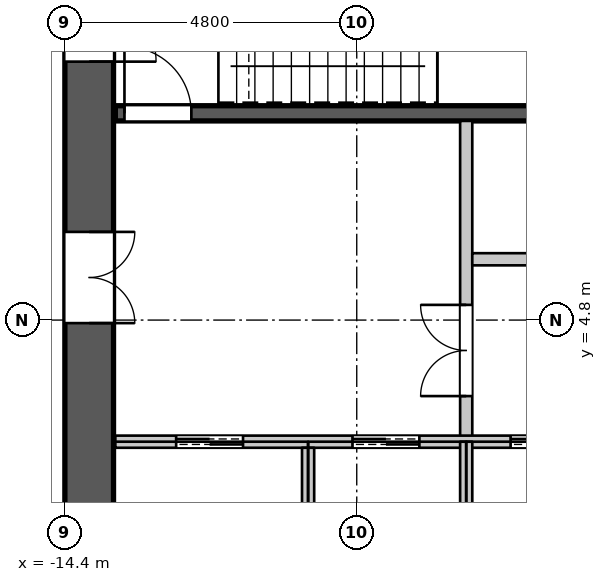
"""IFC4 building model, lengths in metres.
Left out: names, types, materials, properties, quantities, classifications, styles, units other than length and angle.
Written with IfcOpenShell. Run it as: python <this file> out.ifc"""

import sys

from ifc_helpers import new_model, si_unit, direction, frame, frame_2d, origin, place, context, subcontext, project, spatial, rectangle, extrude, element, fill, save


model = new_model("IFC4")
c1 = context("Model", 3, precision=1e-05, world=origin(), true_north=direction((0.0, 1.0)))
c2 = subcontext(c1, "Body", "Model", "MODEL_VIEW")
j1 = project(units=[si_unit("LENGTHUNIT", "METRE"), si_unit("PLANEANGLEUNIT", "RADIAN")], contexts=[c1])
p1 = place(None, origin())
s1 = spatial("IfcSite", under=j1, at=p1, CompositionType="ELEMENT")
p2 = place(p1, origin())
s2 = spatial("IfcBuilding", under=s1, at=p2, CompositionType="ELEMENT")
p3 = place(p2, frame((0.0, 0.0, 131.7)))
s3 = spatial("IfcBuildingStorey", under=s2, at=p3, CompositionType="ELEMENT", Elevation=131.7)
p4 = place(p3, frame((-14.0, -11.2, 0.0), z_axis=(0.0, 0.0, 1.0), x_axis=(0.0, 1.0, 0.0)))
e1 = element("IfcWall", 1, at=p4, inside=s3, PredefinedType="SHEAR", context=c2, shape_type="SweptSolid", body=[
    extrude(rectangle(XDim=22.4, YDim=0.8, at=frame_2d((11.2, 0.0))), origin(), (0.0, 0.0, 1.0), 4.2),
])
p5 = place(p4, frame((20.25, 0.0, 0.0)))
e2 = element("IfcOpeningElement", 2, at=p5, cuts=e1, PredefinedType="OPENING", context=c2, shape_type="SweptSolid", body=[
    extrude(rectangle(XDim=1.1, YDim=2.2, at=frame_2d((0.55, 1.1))), frame((0.0, 0.41, 0.0), z_axis=(0.0, -1.0, 0.0), x_axis=(1.0, 0.0, 0.0)), (0.0, 0.0, 1.0), 0.82),
])
p6 = place(p4, frame((1.05, 0.0, 0.0)))
e3 = element("IfcOpeningElement", 3, at=p6, cuts=e1, PredefinedType="OPENING", context=c2, shape_type="SweptSolid", body=[
    extrude(rectangle(XDim=1.1, YDim=2.2, at=frame_2d((0.55, 1.1))), frame((0.0, 0.41, 0.0), z_axis=(0.0, -1.0, 0.0), x_axis=(1.0, 0.0, 0.0)), (0.0, 0.0, 1.0), 0.82),
])
p7 = place(p4, frame((15.95, 0.0, 0.0)))
e4 = element("IfcOpeningElement", 4, at=p7, cuts=e1, PredefinedType="OPENING", context=c2, shape_type="SweptSolid", body=[
    extrude(rectangle(XDim=1.5, YDim=2.4, at=frame_2d((0.75, 1.2))), frame((0.0, 0.41, 0.0), z_axis=(0.0, -1.0, 0.0), x_axis=(1.0, 0.0, 0.0)), (0.0, 0.0, 1.0), 0.82),
])
p8 = place(p4, frame((4.95, 0.0, 0.0)))
e5 = element("IfcOpeningElement", 5, at=p8, cuts=e1, PredefinedType="OPENING", context=c2, shape_type="SweptSolid", body=[
    extrude(rectangle(XDim=1.5, YDim=2.4, at=frame_2d((0.75, 1.2))), frame((0.0, 0.41, 0.0), z_axis=(0.0, -1.0, 0.0), x_axis=(1.0, 0.0, 0.0)), (0.0, 0.0, 1.0), 0.82),
])
p9 = place(p3, frame((-7.8, 2.8, 0.0), z_axis=(0.0, 0.0, 1.0), x_axis=(0.0, 1.0, 0.0)))
e6 = element("IfcWall", 6, at=p9, inside=s3, PredefinedType="PARTITIONING", context=c2, shape_type="SweptSolid", body=[
    extrude(rectangle(XDim=5.275, YDim=0.2, at=frame_2d((2.637, 0.0))), origin(), (0.0, 0.0, 1.0), 3.95),
])
p10 = place(p9, frame((0.75, 0.0, 0.0)))
e7 = element("IfcOpeningElement", 7, at=p10, cuts=e6, PredefinedType="OPENING", context=c2, shape_type="SweptSolid", body=[
    extrude(rectangle(XDim=1.5, YDim=2.4, at=frame_2d((0.75, 1.2))), frame((0.0, 0.11, 0.0), z_axis=(0.0, -1.0, 0.0), x_axis=(1.0, 0.0, 0.0)), (0.0, 0.0, 1.0), 0.22),
])
p11 = place(p3, frame((-7.7, 5.8, 0.0), z_axis=(0.0, 0.0, 1.0), x_axis=(1.0, 0.0, 0.0)))
e8 = element("IfcWall", 8, at=p11, inside=s3, PredefinedType="PARTITIONING", context=c2, shape_type="SweptSolid", body=[
    extrude(rectangle(XDim=21.27, YDim=0.2, at=frame_2d((10.635, 0.0))), origin(), (0.0, 0.0, 1.0), 3.95),
])
p12 = place(p11, frame((4.55, 0.0, 0.0)))
e9 = element("IfcOpeningElement", 9, at=p12, cuts=e8, PredefinedType="OPENING", context=c2, shape_type="SweptSolid", body=[
    extrude(rectangle(XDim=0.9, YDim=2.2, at=frame_2d((0.45, 1.1))), frame((0.0, 0.11, 0.0), z_axis=(0.0, -1.0, 0.0), x_axis=(1.0, 0.0, 0.0)), (0.0, 0.0, 1.0), 0.22),
])
p13 = place(p11, frame((15.05, 0.0, 0.0)))
e10 = element("IfcOpeningElement", 10, at=p13, cuts=e8, PredefinedType="OPENING", context=c2, shape_type="SweptSolid", body=[
    extrude(rectangle(XDim=0.9, YDim=2.2, at=frame_2d((0.45, 1.1))), frame((0.0, 0.11, 0.0), z_axis=(0.0, -1.0, 0.0), x_axis=(1.0, 0.0, 0.0)), (0.0, 0.0, 1.0), 0.22),
])
p14 = place(p3, frame((-13.57, 2.8, 0.0), z_axis=(0.0, 0.0, 1.0), x_axis=(1.0, 0.0, 0.0)))
e11 = element("IfcWall", 11, at=p14, inside=s3, PredefinedType="PARTITIONING", context=c2, shape_type="SweptSolid", body=[
    extrude(rectangle(XDim=23.97, YDim=0.2, at=frame_2d((11.985, 0.0))), origin(), (0.0, 0.0, 1.0), 3.95),
])
p15 = place(p14, frame((1.0, 0.0, 0.0)))
e12 = element("IfcOpeningElement", 12, at=p15, cuts=e11, PredefinedType="OPENING", context=c2, shape_type="SweptSolid", body=[
    extrude(rectangle(XDim=1.1, YDim=2.2, at=frame_2d((0.55, 1.1))), frame((0.0, 0.11, 0.0), z_axis=(0.0, -1.0, 0.0), x_axis=(1.0, 0.0, 0.0)), (0.0, 0.0, 1.0), 0.22),
])
p16 = place(p14, frame((3.9, 0.0, 0.0)))
e13 = element("IfcOpeningElement", 13, at=p16, cuts=e11, PredefinedType="OPENING", context=c2, shape_type="SweptSolid", body=[
    extrude(rectangle(XDim=1.1, YDim=2.2, at=frame_2d((0.55, 1.1))), frame((0.0, 0.11, 0.0), z_axis=(0.0, -1.0, 0.0), x_axis=(1.0, 0.0, 0.0)), (0.0, 0.0, 1.0), 0.22),
])
p17 = place(p14, frame((6.5, 0.0, 0.0)))
e14 = element("IfcOpeningElement", 14, at=p17, cuts=e11, PredefinedType="OPENING", context=c2, shape_type="SweptSolid", body=[
    extrude(rectangle(XDim=1.1, YDim=2.2, at=frame_2d((0.55, 1.1))), frame((0.0, 0.11, 0.0), z_axis=(0.0, -1.0, 0.0), x_axis=(1.0, 0.0, 0.0)), (0.0, 0.0, 1.0), 0.22),
])
p18 = place(p14, frame((9.1, 0.0, 0.0)))
e15 = element("IfcOpeningElement", 15, at=p18, cuts=e11, PredefinedType="OPENING", context=c2, shape_type="SweptSolid", body=[
    extrude(rectangle(XDim=1.1, YDim=2.2, at=frame_2d((0.55, 1.1))), frame((0.0, 0.11, 0.0), z_axis=(0.0, -1.0, 0.0), x_axis=(1.0, 0.0, 0.0)), (0.0, 0.0, 1.0), 0.22),
])
p19 = place(p14, frame((11.7, 0.0, 0.0)))
e16 = element("IfcOpeningElement", 16, at=p19, cuts=e11, PredefinedType="OPENING", context=c2, shape_type="SweptSolid", body=[
    extrude(rectangle(XDim=1.1, YDim=2.2, at=frame_2d((0.55, 1.1))), frame((0.0, 0.11, 0.0), z_axis=(0.0, -1.0, 0.0), x_axis=(1.0, 0.0, 0.0)), (0.0, 0.0, 1.0), 0.22),
])
p20 = place(p14, frame((14.3, 0.0, 0.0)))
e17 = element("IfcOpeningElement", 17, at=p20, cuts=e11, PredefinedType="OPENING", context=c2, shape_type="SweptSolid", body=[
    extrude(rectangle(XDim=1.1, YDim=2.2, at=frame_2d((0.55, 1.1))), frame((0.0, 0.11, 0.0), z_axis=(0.0, -1.0, 0.0), x_axis=(1.0, 0.0, 0.0)), (0.0, 0.0, 1.0), 0.22),
])
p21 = place(p14, frame((16.9, 0.0, 0.0)))
e18 = element("IfcOpeningElement", 18, at=p21, cuts=e11, PredefinedType="OPENING", context=c2, shape_type="SweptSolid", body=[
    extrude(rectangle(XDim=1.1, YDim=2.2, at=frame_2d((0.55, 1.1))), frame((0.0, 0.11, 0.0), z_axis=(0.0, -1.0, 0.0), x_axis=(1.0, 0.0, 0.0)), (0.0, 0.0, 1.0), 0.22),
])
p22 = place(p14, frame((19.5, 0.0, 0.0)))
e19 = element("IfcOpeningElement", 19, at=p22, cuts=e11, PredefinedType="OPENING", context=c2, shape_type="SweptSolid", body=[
    extrude(rectangle(XDim=1.1, YDim=2.2, at=frame_2d((0.55, 1.1))), frame((0.0, 0.11, 0.0), z_axis=(0.0, -1.0, 0.0), x_axis=(1.0, 0.0, 0.0)), (0.0, 0.0, 1.0), 0.22),
])
p23 = place(p3, frame((-10.4, 0.0, 0.0), z_axis=(0.0, 0.0, 1.0), x_axis=(0.0, 1.0, 0.0)))
e20 = element("IfcWall", 20, at=p23, inside=s3, PredefinedType="PARTITIONING", context=c2, shape_type="SweptSolid", body=[
    extrude(rectangle(XDim=2.7, YDim=0.2, at=frame_2d((1.35, 0.0))), origin(), (0.0, 0.0, 1.0), 3.95),
])
p24 = place(p3, frame((-7.8, 0.0, 0.0), z_axis=(0.0, 0.0, 1.0), x_axis=(0.0, 1.0, 0.0)))
e21 = element("IfcWall", 21, at=p24, inside=s3, PredefinedType="PARTITIONING", context=c2, shape_type="SweptSolid", body=[
    extrude(rectangle(XDim=2.8, YDim=0.2, at=frame_2d((1.4, 0.0))), origin(), (0.0, 0.0, 1.0), 3.95),
])
p25 = place(p3, frame((-13.57, 8.2, 0.0), z_axis=(0.0, 0.0, 1.0), x_axis=(1.0, 0.0, 0.0)))
e22 = element("IfcWall", 22, at=p25, inside=s3, PredefinedType="SHEAR", context=c2, shape_type="SweptSolid", body=[
    extrude(rectangle(XDim=8.295, YDim=0.25, at=frame_2d((4.147, 0.0))), origin(), (0.0, 0.0, 1.0), 3.95),
])
p26 = place(p25, frame((0.15, 0.0, 0.0)))
e23 = element("IfcOpeningElement", 23, at=p26, cuts=e22, PredefinedType="OPENING", context=c2, shape_type="SweptSolid", body=[
    extrude(rectangle(XDim=1.1, YDim=2.2, at=frame_2d((0.55, 1.1))), frame((0.0, 0.135, 0.0), z_axis=(0.0, -1.0, 0.0), x_axis=(1.0, 0.0, 0.0)), (0.0, 0.0, 1.0), 0.27),
])
p27 = place(p15, origin())
e24 = element("IfcDoor", 24, at=p27, inside=s3, OperationType="DOUBLE_DOOR_SLIDING", PredefinedType="DOOR", context=c2, shape_type="SweptSolid", body=[
    extrude(rectangle(XDim=1.1, YDim=2.2, at=frame_2d((0.55, 1.1))), frame((0.0, 0.025, 0.0), z_axis=(0.0, -1.0, 0.0), x_axis=(1.0, 0.0, 0.0)), (0.0, 0.0, 1.0), 0.05),
])
fill(e12, e24)
p28 = place(p16, origin())
e25 = element("IfcDoor", 25, at=p28, inside=s3, OperationType="DOUBLE_DOOR_SLIDING", PredefinedType="DOOR", context=c2, shape_type="SweptSolid", body=[
    extrude(rectangle(XDim=1.1, YDim=2.2, at=frame_2d((0.55, 1.1))), frame((0.0, 0.025, 0.0), z_axis=(0.0, -1.0, 0.0), x_axis=(1.0, 0.0, 0.0)), (0.0, 0.0, 1.0), 0.05),
])
fill(e13, e25)
p29 = place(p17, origin())
e26 = element("IfcDoor", 26, at=p29, inside=s3, OperationType="DOUBLE_DOOR_SLIDING", PredefinedType="DOOR", context=c2, shape_type="SweptSolid", body=[
    extrude(rectangle(XDim=1.1, YDim=2.2, at=frame_2d((0.55, 1.1))), frame((0.0, 0.025, 0.0), z_axis=(0.0, -1.0, 0.0), x_axis=(1.0, 0.0, 0.0)), (0.0, 0.0, 1.0), 0.05),
])
fill(e14, e26)
p30 = place(p26, origin())
e27 = element("IfcDoor", 27, at=p30, inside=s3, OperationType="SINGLE_SWING_LEFT", PredefinedType="DOOR", context=c2, shape_type="SweptSolid", body=[
    extrude(rectangle(XDim=1.1, YDim=2.2, at=frame_2d((0.55, 1.1))), frame((0.0, 0.025, 0.0), z_axis=(0.0, -1.0, 0.0), x_axis=(1.0, 0.0, 0.0)), (0.0, 0.0, 1.0), 0.05),
])
fill(e23, e27)
p31 = place(p10, origin())
e28 = element("IfcDoor", 28, at=p31, inside=s3, OperationType="DOUBLE_DOOR_SINGLE_SWING", PredefinedType="DOOR", context=c2, shape_type="SweptSolid", body=[
    extrude(rectangle(XDim=1.5, YDim=2.4, at=frame_2d((0.75, 1.2))), frame((0.0, 0.025, 0.0), z_axis=(0.0, -1.0, 0.0), x_axis=(1.0, 0.0, 0.0)), (0.0, 0.0, 1.0), 0.05),
])
fill(e7, e28)
p32 = place(p5, origin())
e29 = element("IfcDoor", 29, at=p32, inside=s3, OperationType="SINGLE_SWING_RIGHT", PredefinedType="DOOR", context=c2, shape_type="SweptSolid", body=[
    extrude(rectangle(XDim=1.1, YDim=2.2, at=frame_2d((0.55, 1.1))), frame((0.0, -0.345, 0.0), z_axis=(0.0, -1.0, 0.0), x_axis=(1.0, 0.0, 0.0)), (0.0, 0.0, 1.0), 0.05),
])
fill(e2, e29)
p33 = place(p7, origin())
e30 = element("IfcDoor", 30, at=p33, inside=s3, OperationType="DOUBLE_DOOR_SINGLE_SWING", PredefinedType="DOOR", context=c2, shape_type="SweptSolid", body=[
    extrude(rectangle(XDim=1.5, YDim=2.4, at=frame_2d((0.75, 1.2))), frame((0.0, -0.345, 0.0), z_axis=(0.0, -1.0, 0.0), x_axis=(1.0, 0.0, 0.0)), (0.0, 0.0, 1.0), 0.05),
])
fill(e4, e30)
save(model, sys.argv[1])
